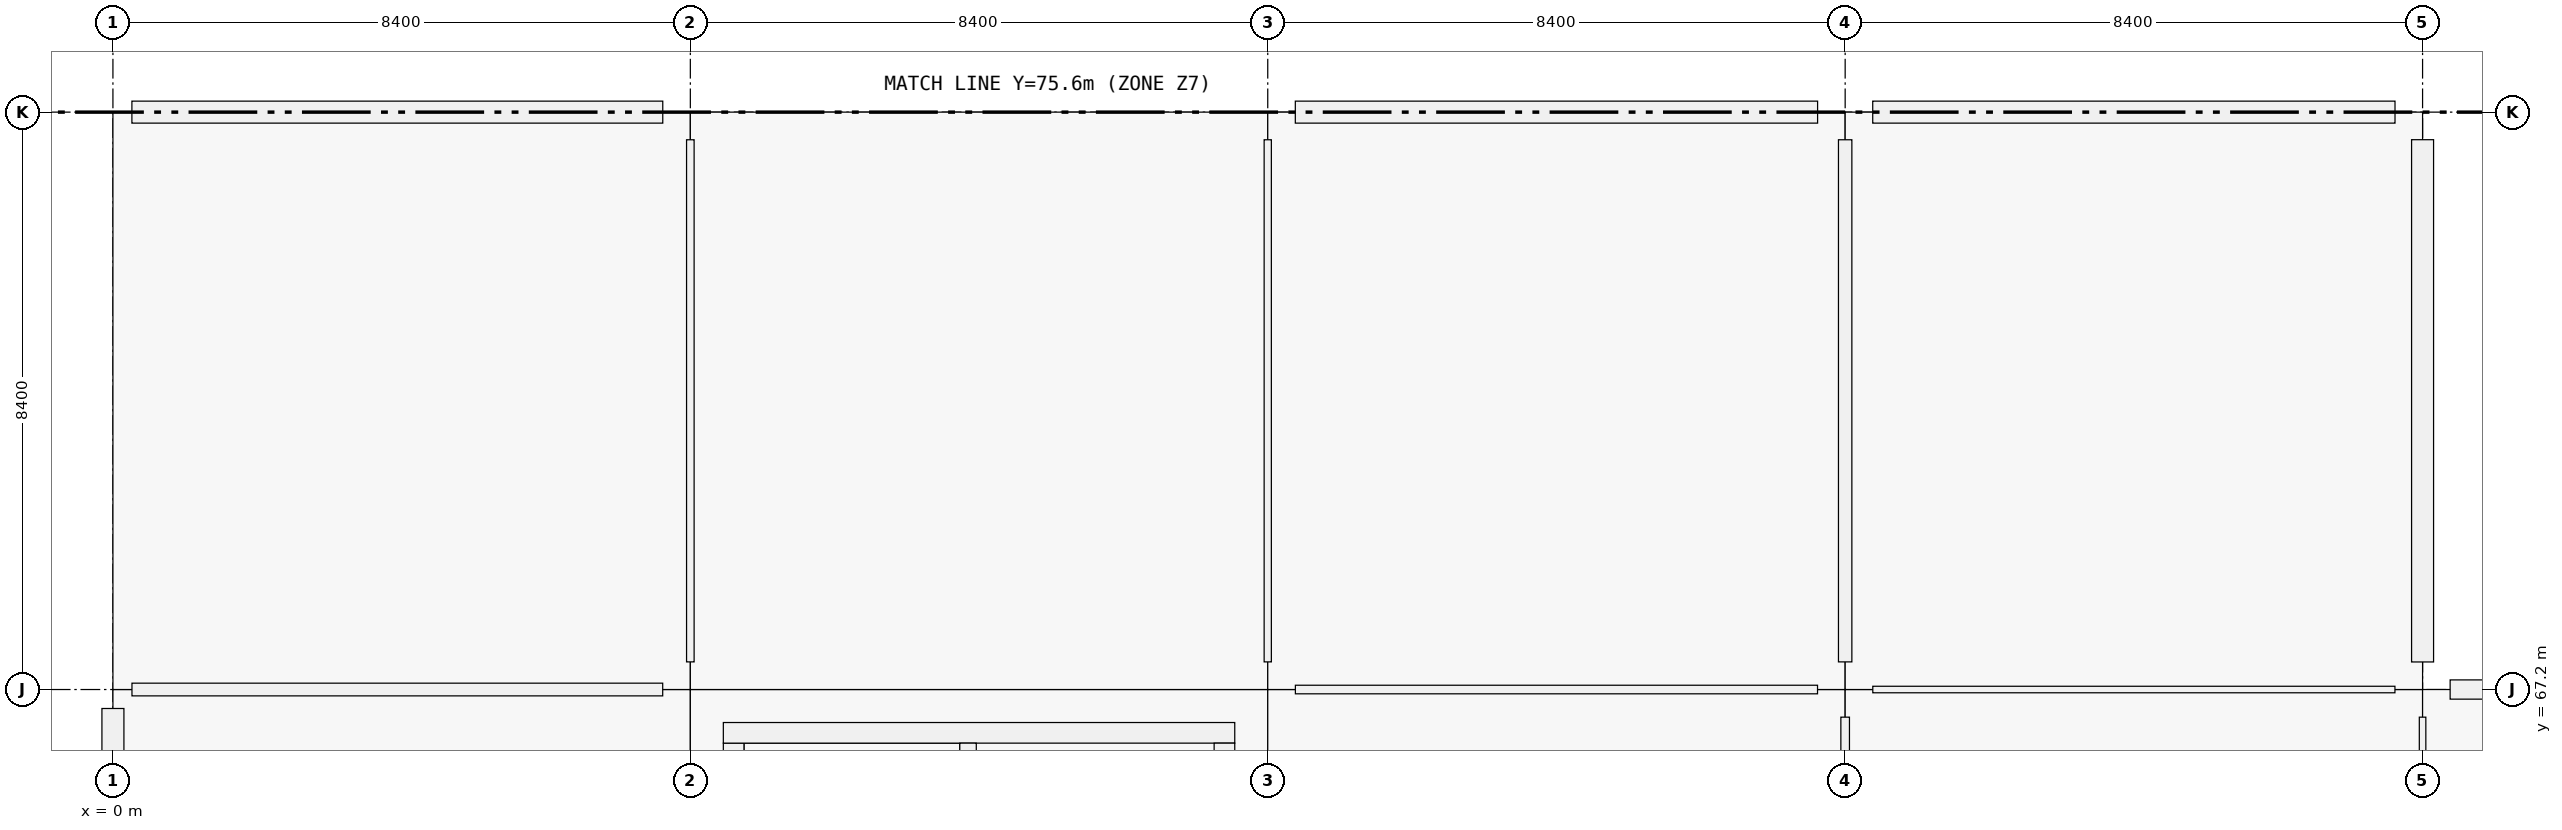
"""IFC4 building model, lengths in metres.
Left out: names, types, materials, properties, quantities, classifications, styles, units other than length and angle.
Written with IfcOpenShell. Run it as: python <this file> out.ifc"""

import sys

from ifc_helpers import new_model, si_unit, direction, frame, frame_2d, origin, origin_2d, place, context, subcontext, project, spatial, rectangle, extrude, element, fill, save


model = new_model("IFC4")
c1 = context("Model", 3, precision=1e-05, world=origin(), true_north=direction((0.0, 1.0)))
c2 = subcontext(c1, "Body", "Model", "MODEL_VIEW")
j1 = project(units=[si_unit("LENGTHUNIT", "METRE"), si_unit("PLANEANGLEUNIT", "RADIAN")], contexts=[c1])
p1 = place(None, origin())
s1 = spatial("IfcSite", under=j1, at=p1, CompositionType="ELEMENT")
p2 = place(p1, origin())
s2 = spatial("IfcBuilding", under=s1, at=p2, CompositionType="ELEMENT")
p3 = place(p2, frame((0.0, 0.0, 5.76)))
s3 = spatial("IfcBuildingStorey", under=s2, at=p3, CompositionType="ELEMENT", Elevation=5.76)
for number, where, z_axis, x_axis in (
    (1, (0.0, 67.2, 0.0), (0.0, 0.0, 1.0), (1.0, 0.0, 0.0)),
    (2, (0.0, 75.6, 0.0), (0.0, 0.0, 1.0), (1.0, 0.0, 0.0)),
):
    element("IfcColumn", number, at=place(p3, frame(where, z_axis=z_axis, x_axis=x_axis)), inside=s3, PredefinedType="COLUMN", context=c2, shape_type="SweptSolid", body=[
        extrude(rectangle(XDim=0.55, YDim=0.55, at=origin_2d()), origin(), (0.0, 0.0, 1.0), 4.2),
    ])
for number, where, z_axis, x_axis in (
    (3, (8.4, 67.2, 0.0), (0.0, 0.0, 1.0), (1.0, 0.0, 0.0)),
    (4, (8.4, 75.6, 0.0), (0.0, 0.0, 1.0), (1.0, 0.0, 0.0)),
    (5, (16.8, 67.2, 0.0), (0.0, 0.0, 1.0), (1.0, 0.0, 0.0)),
    (6, (16.8, 75.6, 0.0), (0.0, 0.0, 1.0), (1.0, 0.0, 0.0)),
    (7, (25.2, 67.2, 0.0), (0.0, 0.0, 1.0), (1.0, 0.0, 0.0)),
    (8, (25.2, 75.6, 0.0), (0.0, 0.0, 1.0), (1.0, 0.0, 0.0)),
    (9, (33.6, 67.2, 0.0), (0.0, 0.0, 1.0), (1.0, 0.0, 0.0)),
    (10, (33.6, 75.6, 0.0), (0.0, 0.0, 1.0), (1.0, 0.0, 0.0)),
):
    element("IfcColumn", number, at=place(p3, frame(where, z_axis=z_axis, x_axis=x_axis)), inside=s3, PredefinedType="COLUMN", context=c2, shape_type="SweptSolid", body=[
        extrude(rectangle(XDim=0.8, YDim=0.8, at=origin_2d()), origin(), (0.0, 0.0, 1.0), 4.5),
    ])
p4 = place(p3, frame((0.0, 59.076, 0.0), z_axis=(0.0, 0.0, 1.0), x_axis=(0.0, 1.0, 0.0)))
e11 = element("IfcWall", 11, at=p4, inside=s3, PredefinedType="SOLIDWALL", context=c2, shape_type="SweptSolid", body=[
    extrude(rectangle(XDim=7.848, YDim=0.32, at=frame_2d((3.924, 0.0))), origin(), (0.0, 0.0, 1.0), 3.4),
])
p5 = place(p4, frame((2.724, 0.0, 0.9)))
e12 = element("IfcOpeningElement", 12, at=p5, cuts=e11, PredefinedType="OPENING", context=c2, shape_type="SweptSolid", body=[
    extrude(rectangle(XDim=2.4, YDim=2.25, at=frame_2d((1.2, 1.125))), frame((0.0, 0.16, 0.0), z_axis=(0.0, -1.0, 0.0), x_axis=(1.0, 0.0, 0.0)), (0.0, 0.0, 1.0), 0.32),
])
p6 = place(p3, frame((0.276, 75.6, 0.0), z_axis=(0.0, 0.0, 1.0), x_axis=(1.0, 0.0, 0.0)))
e13 = element("IfcWall", 13, at=p6, inside=s3, PredefinedType="SOLIDWALL", context=c2, shape_type="SweptSolid", body=[
    extrude(rectangle(XDim=7.723, YDim=0.32, at=frame_2d((3.862, 0.0))), origin(), (0.0, 0.0, 1.0), 3.4),
])
p7 = place(p6, frame((2.861, 0.0, 0.9)))
e14 = element("IfcOpeningElement", 14, at=p7, cuts=e13, PredefinedType="OPENING", context=c2, shape_type="SweptSolid", body=[
    extrude(rectangle(XDim=2.0, YDim=2.25, at=frame_2d((1.0, 1.125))), frame((0.0, 0.16, 0.0), z_axis=(0.0, -1.0, 0.0), x_axis=(1.0, 0.0, 0.0)), (0.0, 0.0, 1.0), 0.32),
])
p8 = place(p3, frame((17.201, 75.6, 0.0), z_axis=(0.0, 0.0, 1.0), x_axis=(1.0, 0.0, 0.0)))
e15 = element("IfcWall", 15, at=p8, inside=s3, PredefinedType="SOLIDWALL", context=c2, shape_type="SweptSolid", body=[
    extrude(rectangle(XDim=7.598, YDim=0.32, at=frame_2d((3.799, 0.0))), origin(), (0.0, 0.0, 1.0), 3.4),
])
p9 = place(p8, frame((3.049, 0.0, 0.9)))
e16 = element("IfcOpeningElement", 16, at=p9, cuts=e15, PredefinedType="OPENING", context=c2, shape_type="SweptSolid", body=[
    extrude(rectangle(XDim=1.5, YDim=1.2, at=frame_2d((0.75, 0.6))), frame((0.0, 0.16, 0.0), z_axis=(0.0, -1.0, 0.0), x_axis=(1.0, 0.0, 0.0)), (0.0, 0.0, 1.0), 0.32),
])
p10 = place(p3, frame((25.601, 75.6, 0.0), z_axis=(0.0, 0.0, 1.0), x_axis=(1.0, 0.0, 0.0)))
e17 = element("IfcWall", 17, at=p10, inside=s3, PredefinedType="SOLIDWALL", context=c2, shape_type="SweptSolid", body=[
    extrude(rectangle(XDim=7.598, YDim=0.32, at=frame_2d((3.799, 0.0))), origin(), (0.0, 0.0, 1.0), 3.4),
])
p11 = place(p10, frame((2.724, 0.0, 0.9)))
e18 = element("IfcOpeningElement", 18, at=p11, cuts=e17, PredefinedType="OPENING", context=c2, shape_type="SweptSolid", body=[
    extrude(rectangle(XDim=2.15, YDim=1.95, at=frame_2d((1.075, 0.975))), frame((0.0, 0.16, 0.0), z_axis=(0.0, -1.0, 0.0), x_axis=(1.0, 0.0, 0.0)), (0.0, 0.0, 1.0), 0.32),
])
p12 = place(p3, frame((33.6, 75.199, 0.0), z_axis=(0.0, 0.0, 1.0), x_axis=(0.0, -1.0, 0.0)))
e19 = element("IfcWall", 19, at=p12, inside=s3, PredefinedType="SOLIDWALL", context=c2, shape_type="SweptSolid", body=[
    extrude(rectangle(XDim=7.598, YDim=0.32, at=frame_2d((3.799, 0.0))), origin(), (0.0, 0.0, 1.0), 3.4),
])
p13 = place(p12, frame((2.524, 0.0, 0.9)))
e20 = element("IfcOpeningElement", 20, at=p13, cuts=e19, PredefinedType="OPENING", context=c2, shape_type="SweptSolid", body=[
    extrude(rectangle(XDim=2.55, YDim=1.95, at=frame_2d((1.275, 0.975))), frame((0.0, 0.16, 0.0), z_axis=(0.0, -1.0, 0.0), x_axis=(1.0, 0.0, 0.0)), (0.0, 0.0, 1.0), 0.32),
])
p14 = place(p3, frame((34.001, 67.2, 0.0), z_axis=(0.0, 0.0, 1.0), x_axis=(1.0, 0.0, 0.0)))
e21 = element("IfcWall", 21, at=p14, inside=s3, PredefinedType="SOLIDWALL", context=c2, shape_type="SweptSolid", body=[
    extrude(rectangle(XDim=7.598, YDim=0.28, at=frame_2d((3.799, 0.0))), origin(), (0.0, 0.0, 1.0), 3.4),
])
p15 = place(p14, frame((3.149, 0.0, 0.9)))
e22 = element("IfcOpeningElement", 22, at=p15, cuts=e21, PredefinedType="OPENING", context=c2, shape_type="SweptSolid", body=[
    extrude(rectangle(XDim=1.3, YDim=1.95, at=frame_2d((0.65, 0.975))), frame((0.0, 0.14, 0.0), z_axis=(0.0, -1.0, 0.0), x_axis=(1.0, 0.0, 0.0)), (0.0, 0.0, 1.0), 0.28),
])
p16 = place(p3, frame((9.03, 59.58, 0.0), z_axis=(0.0, 0.0, 1.0), x_axis=(0.0, 1.0, 0.0)))
e23 = element("IfcWall", 23, at=p16, inside=s3, PredefinedType="SHEAR", context=c2, shape_type="SweptSolid", body=[
    extrude(rectangle(XDim=6.84, YDim=0.3, at=frame_2d((3.42, 0.0))), origin(), (0.0, 0.0, 1.0), 4.5),
])
p17 = place(p3, frame((8.88, 66.57, 0.0), z_axis=(0.0, 0.0, 1.0), x_axis=(1.0, 0.0, 0.0)))
e24 = element("IfcWall", 24, at=p17, inside=s3, PredefinedType="SHEAR", context=c2, shape_type="SweptSolid", body=[
    extrude(rectangle(XDim=7.44, YDim=0.3, at=frame_2d((3.72, 0.0))), origin(), (0.0, 0.0, 1.0), 4.5),
])
p18 = place(p3, frame((16.17, 66.42, 0.0), z_axis=(0.0, 0.0, 1.0), x_axis=(0.0, -1.0, 0.0)))
e25 = element("IfcWall", 25, at=p18, inside=s3, PredefinedType="SHEAR", context=c2, shape_type="SweptSolid", body=[
    extrude(rectangle(XDim=6.84, YDim=0.3, at=frame_2d((3.42, 0.0))), origin(), (0.0, 0.0, 1.0), 4.5),
])
p19 = place(p3, frame((12.44, 59.58, 0.0), z_axis=(0.0, 0.0, 1.0), x_axis=(0.0, 1.0, 0.0)))
e26 = element("IfcWall", 26, at=p19, inside=s3, PredefinedType="SHEAR", context=c2, shape_type="SweptSolid", body=[
    extrude(rectangle(XDim=6.84, YDim=0.24, at=frame_2d((3.42, 0.0))), origin(), (0.0, 0.0, 1.0), 4.5),
])
p20 = place(p19, frame((0.12, 0.0, 0.0)))
e27 = element("IfcOpeningElement", 27, at=p20, cuts=e26, PredefinedType="OPENING", context=c2, shape_type="SweptSolid", body=[
    extrude(rectangle(XDim=1.0, YDim=2.15, at=frame_2d((0.5, 1.075))), frame((0.0, 0.12, 0.0), z_axis=(0.0, -1.0, 0.0), x_axis=(1.0, 0.0, 0.0)), (0.0, 0.0, 1.0), 0.24),
])
p21 = place(p3, frame((0.277, 67.2, 0.0), z_axis=(0.0, 0.0, 1.0), x_axis=(1.0, 0.0, 0.0)))
e28 = element("IfcWall", 28, at=p21, inside=s3, PredefinedType="PARTITIONING", context=c2, shape_type="SweptSolid", body=[
    extrude(rectangle(XDim=7.721, YDim=0.185, at=frame_2d((3.86, 0.0))), origin(), (0.0, 0.0, 1.0), 2.4),
])
p22 = place(p21, frame((3.37, 0.0, 0.0)))
e29 = element("IfcOpeningElement", 29, at=p22, cuts=e28, PredefinedType="OPENING", context=c2, shape_type="SweptSolid", body=[
    extrude(rectangle(XDim=0.98, YDim=2.18, at=frame_2d((0.49, 1.09))), frame((0.0, 0.093, 0.0), z_axis=(0.0, -1.0, 0.0), x_axis=(1.0, 0.0, 0.0)), (0.0, 0.0, 1.0), 0.185),
])
p23 = place(p3, frame((17.202, 67.2, 0.0), z_axis=(0.0, 0.0, 1.0), x_axis=(1.0, 0.0, 0.0)))
e30 = element("IfcWall", 30, at=p23, inside=s3, PredefinedType="PARTITIONING", context=c2, shape_type="SweptSolid", body=[
    extrude(rectangle(XDim=7.596, YDim=0.125, at=frame_2d((3.798, 0.0))), origin(), (0.0, 0.0, 1.0), 2.4),
])
p24 = place(p23, frame((3.273, 0.0, 0.0)))
e31 = element("IfcOpeningElement", 31, at=p24, cuts=e30, PredefinedType="OPENING", context=c2, shape_type="SweptSolid", body=[
    extrude(rectangle(XDim=1.05, YDim=2.12, at=frame_2d((0.525, 1.06))), frame((0.0, 0.062, 0.0), z_axis=(0.0, -1.0, 0.0), x_axis=(1.0, 0.0, 0.0)), (0.0, 0.0, 1.0), 0.125),
])
p25 = place(p3, frame((25.602, 67.2, 0.0), z_axis=(0.0, 0.0, 1.0), x_axis=(1.0, 0.0, 0.0)))
e32 = element("IfcWall", 32, at=p25, inside=s3, PredefinedType="PARTITIONING", context=c2, shape_type="SweptSolid", body=[
    extrude(rectangle(XDim=7.596, YDim=0.095, at=frame_2d((3.798, 0.0))), origin(), (0.0, 0.0, 1.0), 2.4),
])
p26 = place(p25, frame((3.258, 0.0, 0.0)))
e33 = element("IfcOpeningElement", 33, at=p26, cuts=e32, PredefinedType="OPENING", context=c2, shape_type="SweptSolid", body=[
    extrude(rectangle(XDim=1.08, YDim=2.22, at=frame_2d((0.54, 1.11))), frame((0.0, 0.047, 0.0), z_axis=(0.0, -1.0, 0.0), x_axis=(1.0, 0.0, 0.0)), (0.0, 0.0, 1.0), 0.095),
])
p27 = place(p3, frame((8.4, 67.602, 0.0), z_axis=(0.0, 0.0, 1.0), x_axis=(0.0, 1.0, 0.0)))
e34 = element("IfcWall", 34, at=p27, inside=s3, PredefinedType="MOVABLE", context=c2, shape_type="SweptSolid", body=[
    extrude(rectangle(XDim=7.596, YDim=0.11, at=frame_2d((3.798, 0.0))), origin(), (0.0, 0.0, 1.0), 2.4),
])
p28 = place(p27, frame((3.318, 0.0, 0.0)))
e35 = element("IfcOpeningElement", 35, at=p28, cuts=e34, PredefinedType="OPENING", context=c2, shape_type="SweptSolid", body=[
    extrude(rectangle(XDim=0.96, YDim=2.18, at=frame_2d((0.48, 1.09))), frame((0.0, 0.055, 0.0), z_axis=(0.0, -1.0, 0.0), x_axis=(1.0, 0.0, 0.0)), (0.0, 0.0, 1.0), 0.11),
])
p29 = place(p3, frame((16.8, 67.602, 0.0), z_axis=(0.0, 0.0, 1.0), x_axis=(0.0, 1.0, 0.0)))
e36 = element("IfcWall", 36, at=p29, inside=s3, PredefinedType="PARTITIONING", context=c2, shape_type="SweptSolid", body=[
    extrude(rectangle(XDim=7.596, YDim=0.105, at=frame_2d((3.798, 0.0))), origin(), (0.0, 0.0, 1.0), 2.4),
])
p30 = place(p29, frame((3.313, 0.0, 0.0)))
e37 = element("IfcOpeningElement", 37, at=p30, cuts=e36, PredefinedType="OPENING", context=c2, shape_type="SweptSolid", body=[
    extrude(rectangle(XDim=0.97, YDim=2.12, at=frame_2d((0.485, 1.06))), frame((0.0, 0.052, 0.0), z_axis=(0.0, -1.0, 0.0), x_axis=(1.0, 0.0, 0.0)), (0.0, 0.0, 1.0), 0.105),
])
p31 = place(p3, frame((25.2, 59.202, 0.0), z_axis=(0.0, 0.0, 1.0), x_axis=(0.0, 1.0, 0.0)))
e38 = element("IfcWall", 38, at=p31, inside=s3, PredefinedType="PARTITIONING", context=c2, shape_type="SweptSolid", body=[
    extrude(rectangle(XDim=7.596, YDim=0.125, at=frame_2d((3.798, 0.0))), origin(), (0.0, 0.0, 1.0), 2.4),
])
p32 = place(p31, frame((3.298, 0.0, 0.0)))
e39 = element("IfcOpeningElement", 39, at=p32, cuts=e38, PredefinedType="OPENING", context=c2, shape_type="SweptSolid", body=[
    extrude(rectangle(XDim=1.0, YDim=2.2, at=frame_2d((0.5, 1.1))), frame((0.0, 0.062, 0.0), z_axis=(0.0, -1.0, 0.0), x_axis=(1.0, 0.0, 0.0)), (0.0, 0.0, 1.0), 0.125),
])
p33 = place(p3, frame((25.2, 67.602, 0.0), z_axis=(0.0, 0.0, 1.0), x_axis=(0.0, 1.0, 0.0)))
e40 = element("IfcWall", 40, at=p33, inside=s3, PredefinedType="PARTITIONING", context=c2, shape_type="SweptSolid", body=[
    extrude(rectangle(XDim=7.596, YDim=0.195, at=frame_2d((3.798, 0.0))), origin(), (0.0, 0.0, 1.0), 2.4),
])
p34 = place(p33, frame((3.288, 0.0, 0.0)))
e41 = element("IfcOpeningElement", 41, at=p34, cuts=e40, PredefinedType="OPENING", context=c2, shape_type="SweptSolid", body=[
    extrude(rectangle(XDim=1.02, YDim=2.2, at=frame_2d((0.51, 1.1))), frame((0.0, 0.098, 0.0), z_axis=(0.0, -1.0, 0.0), x_axis=(1.0, 0.0, 0.0)), (0.0, 0.0, 1.0), 0.195),
])
p35 = place(p3, frame((33.6, 59.202, 0.0), z_axis=(0.0, 0.0, 1.0), x_axis=(0.0, 1.0, 0.0)))
e42 = element("IfcWall", 42, at=p35, inside=s3, PredefinedType="PARTITIONING", context=c2, shape_type="SweptSolid", body=[
    extrude(rectangle(XDim=7.596, YDim=0.095, at=frame_2d((3.798, 0.0))), origin(), (0.0, 0.0, 1.0), 2.4),
])
p36 = place(p35, frame((3.308, 0.0, 0.0)))
e43 = element("IfcOpeningElement", 43, at=p36, cuts=e42, PredefinedType="OPENING", context=c2, shape_type="SweptSolid", body=[
    extrude(rectangle(XDim=0.98, YDim=2.18, at=frame_2d((0.49, 1.09))), frame((0.0, 0.047, 0.0), z_axis=(0.0, -1.0, 0.0), x_axis=(1.0, 0.0, 0.0)), (0.0, 0.0, 1.0), 0.095),
])
p37 = place(p7, origin())
e44 = element("IfcWindow", 44, at=p37, inside=s3, PartitioningType="SINGLE_PANEL", PredefinedType="WINDOW", context=c2, shape_type="SweptSolid", body=[
    extrude(rectangle(XDim=2.0, YDim=2.25, at=frame_2d((1.0, 1.125))), frame((0.0, 0.03, 0.0), z_axis=(0.0, -1.0, 0.0), x_axis=(1.0, 0.0, 0.0)), (0.0, 0.0, 1.0), 0.06),
])
fill(e14, e44)
p38 = place(p9, origin())
e45 = element("IfcWindow", 45, at=p38, inside=s3, PartitioningType="SINGLE_PANEL", PredefinedType="WINDOW", context=c2, shape_type="SweptSolid", body=[
    extrude(rectangle(XDim=1.5, YDim=1.2, at=frame_2d((0.75, 0.6))), frame((0.0, 0.03, 0.0), z_axis=(0.0, -1.0, 0.0), x_axis=(1.0, 0.0, 0.0)), (0.0, 0.0, 1.0), 0.06),
])
fill(e16, e45)
p39 = place(p11, origin())
e46 = element("IfcWindow", 46, at=p39, inside=s3, PartitioningType="SINGLE_PANEL", PredefinedType="WINDOW", context=c2, shape_type="SweptSolid", body=[
    extrude(rectangle(XDim=2.15, YDim=1.95, at=frame_2d((1.075, 0.975))), frame((0.0, 0.03, 0.0), z_axis=(0.0, -1.0, 0.0), x_axis=(1.0, 0.0, 0.0)), (0.0, 0.0, 1.0), 0.06),
])
fill(e18, e46)
p40 = place(p13, origin())
e47 = element("IfcWindow", 47, at=p40, inside=s3, PartitioningType="SINGLE_PANEL", PredefinedType="WINDOW", context=c2, shape_type="SweptSolid", body=[
    extrude(rectangle(XDim=2.55, YDim=1.95, at=frame_2d((1.275, 0.975))), frame((0.0, 0.03, 0.0), z_axis=(0.0, -1.0, 0.0), x_axis=(1.0, 0.0, 0.0)), (0.0, 0.0, 1.0), 0.06),
])
fill(e20, e47)
p41 = place(p24, origin())
e48 = element("IfcDoor", 48, at=p41, inside=s3, OperationType="SINGLE_SWING_LEFT", PredefinedType="DOOR", context=c2, shape_type="SweptSolid", body=[
    extrude(rectangle(XDim=1.05, YDim=2.12, at=frame_2d((0.525, 1.06))), frame((0.0, 0.025, 0.0), z_axis=(0.0, -1.0, 0.0), x_axis=(1.0, 0.0, 0.0)), (0.0, 0.0, 1.0), 0.05),
])
fill(e31, e48)
p42 = place(p22, origin())
e49 = element("IfcDoor", 49, at=p42, inside=s3, OperationType="SINGLE_SWING_RIGHT", PredefinedType="DOOR", context=c2, shape_type="SweptSolid", body=[
    extrude(rectangle(XDim=0.98, YDim=2.18, at=frame_2d((0.49, 1.09))), frame((0.0, 0.025, 0.0), z_axis=(0.0, -1.0, 0.0), x_axis=(1.0, 0.0, 0.0)), (0.0, 0.0, 1.0), 0.05),
])
fill(e29, e49)
p43 = place(p26, origin())
e50 = element("IfcDoor", 50, at=p43, inside=s3, OperationType="SINGLE_SWING_RIGHT", PredefinedType="DOOR", context=c2, shape_type="SweptSolid", body=[
    extrude(rectangle(XDim=1.08, YDim=2.22, at=frame_2d((0.54, 1.11))), frame((0.0, 0.025, 0.0), z_axis=(0.0, -1.0, 0.0), x_axis=(1.0, 0.0, 0.0)), (0.0, 0.0, 1.0), 0.05),
])
fill(e33, e50)
p44 = place(p28, origin())
e51 = element("IfcDoor", 51, at=p44, inside=s3, OperationType="SINGLE_SWING_LEFT", PredefinedType="DOOR", context=c2, shape_type="SweptSolid", body=[
    extrude(rectangle(XDim=0.96, YDim=2.18, at=frame_2d((0.48, 1.09))), frame((0.0, 0.025, 0.0), z_axis=(0.0, -1.0, 0.0), x_axis=(1.0, 0.0, 0.0)), (0.0, 0.0, 1.0), 0.05),
])
fill(e35, e51)
p45 = place(p30, origin())
e52 = element("IfcDoor", 52, at=p45, inside=s3, OperationType="SINGLE_SWING_RIGHT", PredefinedType="DOOR", context=c2, shape_type="SweptSolid", body=[
    extrude(rectangle(XDim=0.97, YDim=2.12, at=frame_2d((0.485, 1.06))), frame((0.0, 0.025, 0.0), z_axis=(0.0, -1.0, 0.0), x_axis=(1.0, 0.0, 0.0)), (0.0, 0.0, 1.0), 0.05),
])
fill(e37, e52)
p46 = place(p34, origin())
e53 = element("IfcDoor", 53, at=p46, inside=s3, OperationType="SINGLE_SWING_LEFT", PredefinedType="DOOR", context=c2, shape_type="SweptSolid", body=[
    extrude(rectangle(XDim=1.02, YDim=2.2, at=frame_2d((0.51, 1.1))), frame((0.0, 0.025, 0.0), z_axis=(0.0, -1.0, 0.0), x_axis=(1.0, 0.0, 0.0)), (0.0, 0.0, 1.0), 0.05),
])
fill(e41, e53)
save(model, sys.argv[1])
